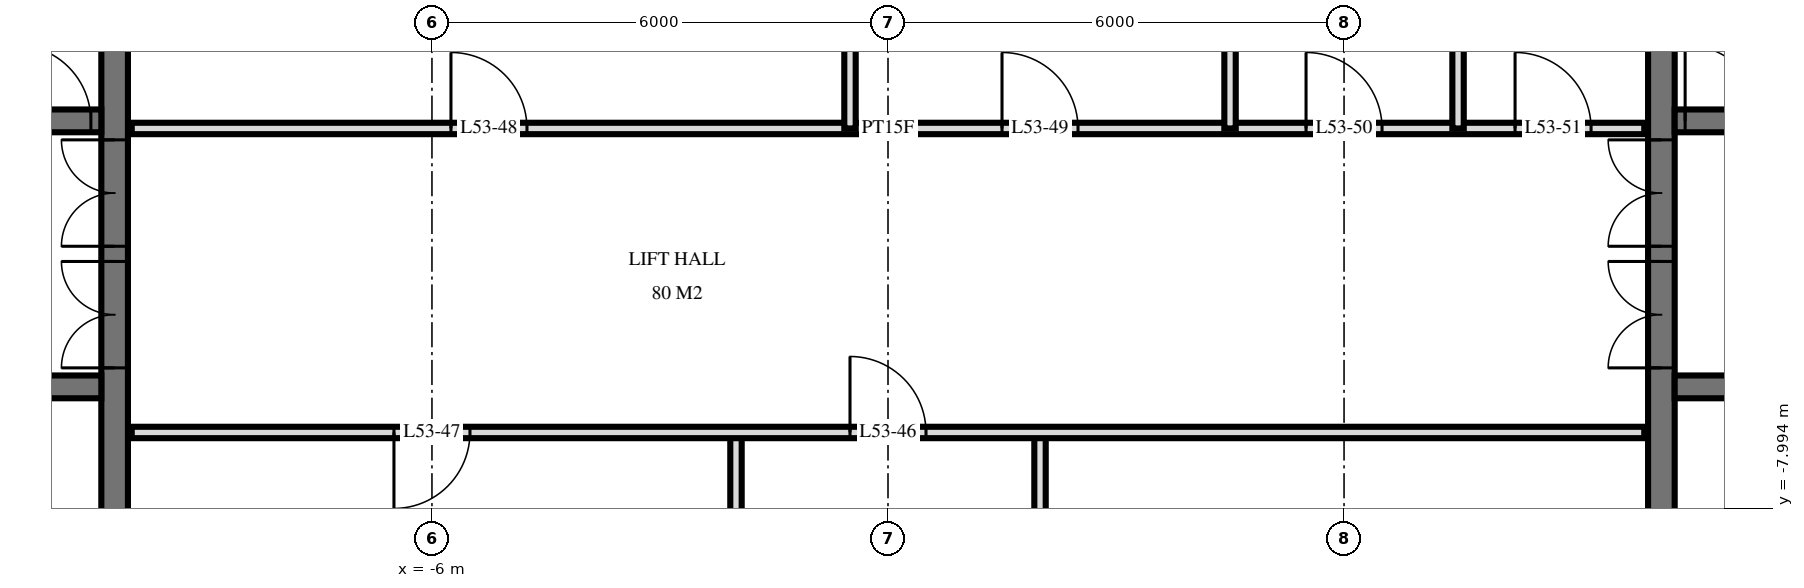
"""IFC4 building model, lengths in metres.
Left out: names, types, materials, properties, quantities, classifications, styles, units other than length and angle.
Written with IfcOpenShell. Run it as: python <this file> out.ifc"""

import sys

from ifc_helpers import new_model, si_unit, direction, frame, frame_2d, origin, place, context, subcontext, project, spatial, rectangle, extrude, element, fill, save


model = new_model("IFC4")
c1 = context("Model", 3, precision=1e-05, world=origin(), true_north=direction((0.0, 1.0)))
c2 = subcontext(c1, "Body", "Model", "MODEL_VIEW")
j1 = project(units=[si_unit("LENGTHUNIT", "METRE"), si_unit("PLANEANGLEUNIT", "RADIAN")], contexts=[c1])
p1 = place(None, origin())
s1 = spatial("IfcSite", under=j1, at=p1, CompositionType="ELEMENT")
p2 = place(p1, origin())
s2 = spatial("IfcBuilding", under=s1, at=p2, CompositionType="ELEMENT")
p3 = place(p2, frame((0.0, 0.0, 204.6)))
s3 = spatial("IfcBuildingStorey", under=s2, at=p3, CompositionType="ELEMENT", Elevation=204.6)
p4 = place(p3, frame((-10.175, -14.55, 0.0), z_axis=(0.0, 0.0, 1.0), x_axis=(0.0, 1.0, 0.0)))
e1 = element("IfcWall", 1, at=p4, inside=s3, PredefinedType="SHEAR", context=c2, shape_type="SweptSolid", body=[
    extrude(rectangle(XDim=14.1, YDim=0.35, at=frame_2d((7.05, 0.0))), origin(), (0.0, 0.0, 1.0), 3.5),
])
p5 = place(p4, frame((8.4, 0.0, 0.0)))
e2 = element("IfcOpeningElement", 2, at=p5, cuts=e1, PredefinedType="OPENING", context=c2, shape_type="SweptSolid", body=[
    extrude(rectangle(XDim=1.4, YDim=2.4, at=frame_2d((0.7, 1.2))), frame((0.0, 0.185, 0.0), z_axis=(0.0, -1.0, 0.0), x_axis=(1.0, 0.0, 0.0)), (0.0, 0.0, 1.0), 0.37),
])
p6 = place(p4, frame((10.0, 0.0, 0.0)))
e3 = element("IfcOpeningElement", 3, at=p6, cuts=e1, PredefinedType="OPENING", context=c2, shape_type="SweptSolid", body=[
    extrude(rectangle(XDim=1.4, YDim=2.4, at=frame_2d((0.7, 1.2))), frame((0.0, 0.185, 0.0), z_axis=(0.0, -1.0, 0.0), x_axis=(1.0, 0.0, 0.0)), (0.0, 0.0, 1.0), 0.37),
])
p7 = place(p4, frame((4.0, 0.0, 0.0)))
e4 = element("IfcOpeningElement", 4, at=p7, cuts=e1, PredefinedType="OPENING", context=c2, shape_type="SweptSolid", body=[
    extrude(rectangle(XDim=1.2, YDim=2.1, at=frame_2d((0.6, 1.05))), frame((0.0, 0.185, 0.0), z_axis=(0.0, -1.0, 0.0), x_axis=(1.0, 0.0, 0.0)), (0.0, 0.0, 1.0), 0.37),
])
p8 = place(p3, frame((-24.05, -2.9, 0.0), z_axis=(0.0, 0.0, 1.0), x_axis=(1.0, 0.0, 0.0)))
e5 = element("IfcWall", 5, at=p8, inside=s3, PredefinedType="SHEAR", context=c2, shape_type="SweptSolid", body=[
    extrude(rectangle(XDim=13.7, YDim=0.3, at=frame_2d((6.85, 0.0))), origin(), (0.0, 0.0, 1.0), 3.5),
])
p9 = place(p8, frame((0.55, 0.0, 0.0)))
e6 = element("IfcOpeningElement", 6, at=p9, cuts=e5, PredefinedType="OPENING", context=c2, shape_type="SweptSolid", body=[
    extrude(rectangle(XDim=1.1, YDim=2.1, at=frame_2d((0.55, 1.05))), frame((0.0, 0.16, 0.0), z_axis=(0.0, -1.0, 0.0), x_axis=(1.0, 0.0, 0.0)), (0.0, 0.0, 1.0), 0.32),
])
p10 = place(p8, frame((6.613, 0.0, 0.0)))
e7 = element("IfcOpeningElement", 7, at=p10, cuts=e5, PredefinedType="OPENING", context=c2, shape_type="SweptSolid", body=[
    extrude(rectangle(XDim=0.9, YDim=2.1, at=frame_2d((0.45, 1.05))), frame((0.0, 0.16, 0.0), z_axis=(0.0, -1.0, 0.0), x_axis=(1.0, 0.0, 0.0)), (0.0, 0.0, 1.0), 0.32),
])
p11 = place(p8, frame((5.188, 0.0, 0.0)))
e8 = element("IfcOpeningElement", 8, at=p11, cuts=e5, PredefinedType="OPENING", context=c2, shape_type="SweptSolid", body=[
    extrude(rectangle(XDim=0.9, YDim=2.1, at=frame_2d((0.45, 1.05))), frame((0.0, 0.16, 0.0), z_axis=(0.0, -1.0, 0.0), x_axis=(1.0, 0.0, 0.0)), (0.0, 0.0, 1.0), 0.32),
])
p12 = place(p8, frame((12.562, 0.0, 0.0)))
e9 = element("IfcOpeningElement", 9, at=p12, cuts=e5, PredefinedType="OPENING", context=c2, shape_type="SweptSolid", body=[
    extrude(rectangle(XDim=1.0, YDim=2.1, at=frame_2d((0.5, 1.05))), frame((0.0, 0.16, 0.0), z_axis=(0.0, -1.0, 0.0), x_axis=(1.0, 0.0, 0.0)), (0.0, 0.0, 1.0), 0.32),
])
p13 = place(p8, frame((11.137, 0.0, 0.0)))
e10 = element("IfcOpeningElement", 10, at=p13, cuts=e5, PredefinedType="OPENING", context=c2, shape_type="SweptSolid", body=[
    extrude(rectangle(XDim=1.0, YDim=2.1, at=frame_2d((0.5, 1.05))), frame((0.0, 0.16, 0.0), z_axis=(0.0, -1.0, 0.0), x_axis=(1.0, 0.0, 0.0)), (0.0, 0.0, 1.0), 0.32),
])
p14 = place(p8, frame((8.85, 0.0, 0.0)))
e11 = element("IfcOpeningElement", 11, at=p14, cuts=e5, PredefinedType="OPENING", context=c2, shape_type="SweptSolid", body=[
    extrude(rectangle(XDim=1.0, YDim=2.1, at=frame_2d((0.5, 1.05))), frame((0.0, 0.16, 0.0), z_axis=(0.0, -1.0, 0.0), x_axis=(1.0, 0.0, 0.0)), (0.0, 0.0, 1.0), 0.32),
])
p15 = place(p8, frame((3.0, 0.0, 0.0)))
e12 = element("IfcOpeningElement", 12, at=p15, cuts=e5, PredefinedType="OPENING", context=c2, shape_type="SweptSolid", body=[
    extrude(rectangle(XDim=1.0, YDim=2.1, at=frame_2d((0.5, 1.05))), frame((0.0, 0.16, 0.0), z_axis=(0.0, -1.0, 0.0), x_axis=(1.0, 0.0, 0.0)), (0.0, 0.0, 1.0), 0.32),
])
p16 = place(p3, frame((-24.05, -6.4, 0.0), z_axis=(0.0, 0.0, 1.0), x_axis=(1.0, 0.0, 0.0)))
e13 = element("IfcWall", 13, at=p16, inside=s3, PredefinedType="SHEAR", context=c2, shape_type="SweptSolid", body=[
    extrude(rectangle(XDim=13.7, YDim=0.3, at=frame_2d((6.85, 0.0))), origin(), (0.0, 0.0, 1.0), 3.5),
])
p17 = place(p16, frame((0.55, 0.0, 0.0)))
e14 = element("IfcOpeningElement", 14, at=p17, cuts=e13, PredefinedType="OPENING", context=c2, shape_type="SweptSolid", body=[
    extrude(rectangle(XDim=1.1, YDim=2.1, at=frame_2d((0.55, 1.05))), frame((0.0, 0.16, 0.0), z_axis=(0.0, -1.0, 0.0), x_axis=(1.0, 0.0, 0.0)), (0.0, 0.0, 1.0), 0.32),
])
p18 = place(p16, frame((5.8, 0.0, 0.0)))
e15 = element("IfcOpeningElement", 15, at=p18, cuts=e13, PredefinedType="OPENING", context=c2, shape_type="SweptSolid", body=[
    extrude(rectangle(XDim=1.1, YDim=2.1, at=frame_2d((0.55, 1.05))), frame((0.0, 0.16, 0.0), z_axis=(0.0, -1.0, 0.0), x_axis=(1.0, 0.0, 0.0)), (0.0, 0.0, 1.0), 0.32),
])
p19 = place(p3, frame((10.175, -14.55, 0.0), z_axis=(0.0, 0.0, 1.0), x_axis=(0.0, 1.0, 0.0)))
e16 = element("IfcWall", 16, at=p19, inside=s3, PredefinedType="SHEAR", context=c2, shape_type="SweptSolid", body=[
    extrude(rectangle(XDim=14.1, YDim=0.35, at=frame_2d((7.05, 0.0))), origin(), (0.0, 0.0, 1.0), 3.5),
])
p20 = place(p19, frame((8.4, 0.0, 0.0)))
e17 = element("IfcOpeningElement", 17, at=p20, cuts=e16, PredefinedType="OPENING", context=c2, shape_type="SweptSolid", body=[
    extrude(rectangle(XDim=1.4, YDim=2.4, at=frame_2d((0.7, 1.2))), frame((0.0, 0.185, 0.0), z_axis=(0.0, -1.0, 0.0), x_axis=(1.0, 0.0, 0.0)), (0.0, 0.0, 1.0), 0.37),
])
p21 = place(p19, frame((10.0, 0.0, 0.0)))
e18 = element("IfcOpeningElement", 18, at=p21, cuts=e16, PredefinedType="OPENING", context=c2, shape_type="SweptSolid", body=[
    extrude(rectangle(XDim=1.4, YDim=2.4, at=frame_2d((0.7, 1.2))), frame((0.0, 0.185, 0.0), z_axis=(0.0, -1.0, 0.0), x_axis=(1.0, 0.0, 0.0)), (0.0, 0.0, 1.0), 0.37),
])
p22 = place(p19, frame((4.0, 0.0, 0.0)))
e19 = element("IfcOpeningElement", 19, at=p22, cuts=e16, PredefinedType="OPENING", context=c2, shape_type="SweptSolid", body=[
    extrude(rectangle(XDim=1.2, YDim=2.1, at=frame_2d((0.6, 1.05))), frame((0.0, 0.185, 0.0), z_axis=(0.0, -1.0, 0.0), x_axis=(1.0, 0.0, 0.0)), (0.0, 0.0, 1.0), 0.37),
])
p23 = place(p3, frame((10.35, -2.9, 0.0), z_axis=(0.0, 0.0, 1.0), x_axis=(1.0, 0.0, 0.0)))
e20 = element("IfcWall", 20, at=p23, inside=s3, PredefinedType="SHEAR", context=c2, shape_type="SweptSolid", body=[
    extrude(rectangle(XDim=13.7, YDim=0.3, at=frame_2d((6.85, 0.0))), origin(), (0.0, 0.0, 1.0), 3.5),
])
p24 = place(p23, frame((12.05, 0.0, 0.0)))
e21 = element("IfcOpeningElement", 21, at=p24, cuts=e20, PredefinedType="OPENING", context=c2, shape_type="SweptSolid", body=[
    extrude(rectangle(XDim=1.1, YDim=2.1, at=frame_2d((0.55, 1.05))), frame((0.0, 0.16, 0.0), z_axis=(0.0, -1.0, 0.0), x_axis=(1.0, 0.0, 0.0)), (0.0, 0.0, 1.0), 0.32),
])
p25 = place(p23, frame((6.188, 0.0, 0.0)))
e22 = element("IfcOpeningElement", 22, at=p25, cuts=e20, PredefinedType="OPENING", context=c2, shape_type="SweptSolid", body=[
    extrude(rectangle(XDim=0.9, YDim=2.1, at=frame_2d((0.45, 1.05))), frame((0.0, 0.16, 0.0), z_axis=(0.0, -1.0, 0.0), x_axis=(1.0, 0.0, 0.0)), (0.0, 0.0, 1.0), 0.32),
])
p26 = place(p23, frame((7.613, 0.0, 0.0)))
e23 = element("IfcOpeningElement", 23, at=p26, cuts=e20, PredefinedType="OPENING", context=c2, shape_type="SweptSolid", body=[
    extrude(rectangle(XDim=0.9, YDim=2.1, at=frame_2d((0.45, 1.05))), frame((0.0, 0.16, 0.0), z_axis=(0.0, -1.0, 0.0), x_axis=(1.0, 0.0, 0.0)), (0.0, 0.0, 1.0), 0.32),
])
p27 = place(p23, frame((0.137, 0.0, 0.0)))
e24 = element("IfcOpeningElement", 24, at=p27, cuts=e20, PredefinedType="OPENING", context=c2, shape_type="SweptSolid", body=[
    extrude(rectangle(XDim=1.0, YDim=2.1, at=frame_2d((0.5, 1.05))), frame((0.0, 0.16, 0.0), z_axis=(0.0, -1.0, 0.0), x_axis=(1.0, 0.0, 0.0)), (0.0, 0.0, 1.0), 0.32),
])
p28 = place(p23, frame((1.562, 0.0, 0.0)))
e25 = element("IfcOpeningElement", 25, at=p28, cuts=e20, PredefinedType="OPENING", context=c2, shape_type="SweptSolid", body=[
    extrude(rectangle(XDim=1.0, YDim=2.1, at=frame_2d((0.5, 1.05))), frame((0.0, 0.16, 0.0), z_axis=(0.0, -1.0, 0.0), x_axis=(1.0, 0.0, 0.0)), (0.0, 0.0, 1.0), 0.32),
])
p29 = place(p23, frame((3.85, 0.0, 0.0)))
e26 = element("IfcOpeningElement", 26, at=p29, cuts=e20, PredefinedType="OPENING", context=c2, shape_type="SweptSolid", body=[
    extrude(rectangle(XDim=1.0, YDim=2.1, at=frame_2d((0.5, 1.05))), frame((0.0, 0.16, 0.0), z_axis=(0.0, -1.0, 0.0), x_axis=(1.0, 0.0, 0.0)), (0.0, 0.0, 1.0), 0.32),
])
p30 = place(p23, frame((9.7, 0.0, 0.0)))
e27 = element("IfcOpeningElement", 27, at=p30, cuts=e20, PredefinedType="OPENING", context=c2, shape_type="SweptSolid", body=[
    extrude(rectangle(XDim=1.0, YDim=2.1, at=frame_2d((0.5, 1.05))), frame((0.0, 0.16, 0.0), z_axis=(0.0, -1.0, 0.0), x_axis=(1.0, 0.0, 0.0)), (0.0, 0.0, 1.0), 0.32),
])
p31 = place(p3, frame((10.35, -6.4, 0.0), z_axis=(0.0, 0.0, 1.0), x_axis=(1.0, 0.0, 0.0)))
e28 = element("IfcWall", 28, at=p31, inside=s3, PredefinedType="SHEAR", context=c2, shape_type="SweptSolid", body=[
    extrude(rectangle(XDim=13.7, YDim=0.3, at=frame_2d((6.85, 0.0))), origin(), (0.0, 0.0, 1.0), 3.5),
])
p32 = place(p31, frame((12.05, 0.0, 0.0)))
e29 = element("IfcOpeningElement", 29, at=p32, cuts=e28, PredefinedType="OPENING", context=c2, shape_type="SweptSolid", body=[
    extrude(rectangle(XDim=1.1, YDim=2.1, at=frame_2d((0.55, 1.05))), frame((0.0, 0.16, 0.0), z_axis=(0.0, -1.0, 0.0), x_axis=(1.0, 0.0, 0.0)), (0.0, 0.0, 1.0), 0.32),
])
p33 = place(p31, frame((6.8, 0.0, 0.0)))
e30 = element("IfcOpeningElement", 30, at=p33, cuts=e28, PredefinedType="OPENING", context=c2, shape_type="SweptSolid", body=[
    extrude(rectangle(XDim=1.1, YDim=2.1, at=frame_2d((0.55, 1.05))), frame((0.0, 0.16, 0.0), z_axis=(0.0, -1.0, 0.0), x_axis=(1.0, 0.0, 0.0)), (0.0, 0.0, 1.0), 0.32),
])
for number, where, z_axis, x_axis in (
    (31, (7.5, -3.0, 0.0), (0.0, 0.0, 1.0), (0.0, 1.0, 0.0)),
    (32, (4.5, -3.0, 0.0), (0.0, 0.0, 1.0), (0.0, 1.0, 0.0)),
):
    element("IfcWall", number, at=place(p3, frame(where, z_axis=z_axis, x_axis=x_axis)), inside=s3, PredefinedType="PLUMBINGWALL", context=c2, shape_type="SweptSolid", body=[
        extrude(rectangle(XDim=4.02, YDim=0.15, at=frame_2d((2.01, 0.0))), origin(), (0.0, 0.0, 1.0), 3.22),
    ])
p34 = place(p3, frame((2.0, -11.0, 0.0), z_axis=(0.0, 0.0, 1.0), x_axis=(0.0, 1.0, 0.0)))
e33 = element("IfcWall", 33, at=p34, inside=s3, PredefinedType="PARTITIONING", context=c2, shape_type="SweptSolid", body=[
    extrude(rectangle(XDim=4.0, YDim=0.15, at=frame_2d((2.0, 0.0))), origin(), (0.0, 0.0, 1.0), 3.22),
])
p35 = place(p3, frame((-0.5, -3.0, 0.0), z_axis=(0.0, 0.0, 1.0), x_axis=(0.0, 1.0, 0.0)))
e34 = element("IfcWall", 34, at=p35, inside=s3, PredefinedType="PARTITIONING", context=c2, shape_type="SweptSolid", body=[
    extrude(rectangle(XDim=4.02, YDim=0.15, at=frame_2d((2.01, 0.0))), origin(), (0.0, 0.0, 1.0), 3.22),
])
p36 = place(p3, frame((-2.0, -11.0, 0.0), z_axis=(0.0, 0.0, 1.0), x_axis=(0.0, 1.0, 0.0)))
e35 = element("IfcWall", 35, at=p36, inside=s3, PredefinedType="PARTITIONING", context=c2, shape_type="SweptSolid", body=[
    extrude(rectangle(XDim=4.0, YDim=0.15, at=frame_2d((2.0, 0.0))), origin(), (0.0, 0.0, 1.0), 3.22),
])
p37 = place(p3, frame((-9.95, -7.0, 0.0), z_axis=(0.0, 0.0, 1.0), x_axis=(1.0, 0.0, 0.0)))
e36 = element("IfcWall", 36, at=p37, inside=s3, PredefinedType="PARTITIONING", context=c2, shape_type="SweptSolid", body=[
    extrude(rectangle(XDim=19.9, YDim=0.15, at=frame_2d((9.95, 0.0))), origin(), (0.0, 0.0, 1.0), 3.22),
])
p38 = place(p37, frame((9.45, 0.0, 0.0)))
e37 = element("IfcOpeningElement", 37, at=p38, cuts=e36, PredefinedType="OPENING", context=c2, shape_type="SweptSolid", body=[
    extrude(rectangle(XDim=1.0, YDim=2.1, at=frame_2d((0.5, 1.05))), frame((0.0, 0.085, 0.0), z_axis=(0.0, -1.0, 0.0), x_axis=(1.0, 0.0, 0.0)), (0.0, 0.0, 1.0), 0.17),
])
p39 = place(p37, frame((3.45, 0.0, 0.0)))
e38 = element("IfcOpeningElement", 38, at=p39, cuts=e36, PredefinedType="OPENING", context=c2, shape_type="SweptSolid", body=[
    extrude(rectangle(XDim=1.0, YDim=2.1, at=frame_2d((0.5, 1.05))), frame((0.0, 0.085, 0.0), z_axis=(0.0, -1.0, 0.0), x_axis=(1.0, 0.0, 0.0)), (0.0, 0.0, 1.0), 0.17),
])
p40 = place(p3, frame((-9.95, -3.0, 0.0), z_axis=(0.0, 0.0, 1.0), x_axis=(1.0, 0.0, 0.0)))
e39 = element("IfcWall", 39, at=p40, inside=s3, PredefinedType="PARTITIONING", context=c2, shape_type="SweptSolid", body=[
    extrude(rectangle(XDim=19.9, YDim=0.15, at=frame_2d((9.95, 0.0))), origin(), (0.0, 0.0, 1.0), 3.22),
])
p41 = place(p40, frame((4.2, 0.0, 0.0)))
e40 = element("IfcOpeningElement", 40, at=p41, cuts=e39, PredefinedType="OPENING", context=c2, shape_type="SweptSolid", body=[
    extrude(rectangle(XDim=1.0, YDim=2.1, at=frame_2d((0.5, 1.05))), frame((0.0, 0.085, 0.0), z_axis=(0.0, -1.0, 0.0), x_axis=(1.0, 0.0, 0.0)), (0.0, 0.0, 1.0), 0.17),
])
p42 = place(p40, frame((11.45, 0.0, 0.0)))
e41 = element("IfcOpeningElement", 41, at=p42, cuts=e39, PredefinedType="OPENING", context=c2, shape_type="SweptSolid", body=[
    extrude(rectangle(XDim=1.0, YDim=2.1, at=frame_2d((0.5, 1.05))), frame((0.0, 0.085, 0.0), z_axis=(0.0, -1.0, 0.0), x_axis=(1.0, 0.0, 0.0)), (0.0, 0.0, 1.0), 0.17),
])
p43 = place(p40, frame((15.45, 0.0, 0.0)))
e42 = element("IfcOpeningElement", 42, at=p43, cuts=e39, PredefinedType="OPENING", context=c2, shape_type="SweptSolid", body=[
    extrude(rectangle(XDim=1.0, YDim=2.1, at=frame_2d((0.5, 1.05))), frame((0.0, 0.085, 0.0), z_axis=(0.0, -1.0, 0.0), x_axis=(1.0, 0.0, 0.0)), (0.0, 0.0, 1.0), 0.17),
])
p44 = place(p40, frame((18.2, 0.0, 0.0)))
e43 = element("IfcOpeningElement", 43, at=p44, cuts=e39, PredefinedType="OPENING", context=c2, shape_type="SweptSolid", body=[
    extrude(rectangle(XDim=1.0, YDim=2.1, at=frame_2d((0.5, 1.05))), frame((0.0, 0.085, 0.0), z_axis=(0.0, -1.0, 0.0), x_axis=(1.0, 0.0, 0.0)), (0.0, 0.0, 1.0), 0.17),
])
p45 = place(p5, origin())
e44 = element("IfcDoor", 44, at=p45, inside=s3, OperationType="DOUBLE_DOOR_SINGLE_SWING", PredefinedType="DOOR", context=c2, shape_type="SweptSolid", body=[
    extrude(rectangle(XDim=1.4, YDim=2.4, at=frame_2d((0.7, 1.2))), frame((0.0, 0.025, 0.0), z_axis=(0.0, -1.0, 0.0), x_axis=(1.0, 0.0, 0.0)), (0.0, 0.0, 1.0), 0.05),
])
fill(e2, e44)
p46 = place(p6, origin())
e45 = element("IfcDoor", 45, at=p46, inside=s3, OperationType="DOUBLE_DOOR_SINGLE_SWING", PredefinedType="DOOR", context=c2, shape_type="SweptSolid", body=[
    extrude(rectangle(XDim=1.4, YDim=2.4, at=frame_2d((0.7, 1.2))), frame((0.0, 0.025, 0.0), z_axis=(0.0, -1.0, 0.0), x_axis=(1.0, 0.0, 0.0)), (0.0, 0.0, 1.0), 0.05),
])
fill(e3, e45)
p47 = place(p12, origin())
e46 = element("IfcDoor", 46, at=p47, inside=s3, OperationType="SINGLE_SWING_RIGHT", PredefinedType="DOOR", context=c2, shape_type="SweptSolid", body=[
    extrude(rectangle(XDim=1.0, YDim=2.1, at=frame_2d((0.5, 1.05))), frame((0.0, 0.025, 0.0), z_axis=(0.0, -1.0, 0.0), x_axis=(1.0, 0.0, 0.0)), (0.0, 0.0, 1.0), 0.05),
])
fill(e9, e46)
p48 = place(p20, origin())
e47 = element("IfcDoor", 47, at=p48, inside=s3, OperationType="DOUBLE_DOOR_SINGLE_SWING", PredefinedType="DOOR", context=c2, shape_type="SweptSolid", body=[
    extrude(rectangle(XDim=1.4, YDim=2.4, at=frame_2d((0.7, 1.2))), frame((0.0, 0.025, 0.0), z_axis=(0.0, -1.0, 0.0), x_axis=(1.0, 0.0, 0.0)), (0.0, 0.0, 1.0), 0.05),
])
fill(e17, e47)
p49 = place(p21, origin())
e48 = element("IfcDoor", 48, at=p49, inside=s3, OperationType="DOUBLE_DOOR_SINGLE_SWING", PredefinedType="DOOR", context=c2, shape_type="SweptSolid", body=[
    extrude(rectangle(XDim=1.4, YDim=2.4, at=frame_2d((0.7, 1.2))), frame((0.0, 0.025, 0.0), z_axis=(0.0, -1.0, 0.0), x_axis=(1.0, 0.0, 0.0)), (0.0, 0.0, 1.0), 0.05),
])
fill(e18, e48)
p50 = place(p27, origin())
e49 = element("IfcDoor", 49, at=p50, inside=s3, OperationType="SINGLE_SWING_RIGHT", PredefinedType="DOOR", context=c2, shape_type="SweptSolid", body=[
    extrude(rectangle(XDim=1.0, YDim=2.1, at=frame_2d((0.5, 1.05))), frame((0.0, 0.025, 0.0), z_axis=(0.0, -1.0, 0.0), x_axis=(1.0, 0.0, 0.0)), (0.0, 0.0, 1.0), 0.05),
])
fill(e24, e49)
p51 = place(p38, origin())
e50 = element("IfcDoor", 50, at=p51, inside=s3, OperationType="SINGLE_SWING_RIGHT", PredefinedType="DOOR", context=c2, shape_type="SweptSolid", body=[
    extrude(rectangle(XDim=1.0, YDim=2.1, at=frame_2d((0.5, 1.05))), frame((0.0, 0.025, 0.0), z_axis=(0.0, -1.0, 0.0), x_axis=(1.0, 0.0, 0.0)), (0.0, 0.0, 1.0), 0.05),
])
fill(e37, e50)
p52 = place(p39, frame((0.5, 0.0, 0.0), z_axis=(0.0, 0.0, 1.0), x_axis=(-1.0, 0.0, 0.0)))
e51 = element("IfcDoor", 51, at=p52, inside=s3, OperationType="SINGLE_SWING_LEFT", PredefinedType="DOOR", context=c2, shape_type="SweptSolid", body=[
    extrude(rectangle(XDim=1.0, YDim=2.1, at=frame_2d((0.0, 1.05))), frame((0.0, -0.025, 0.0), z_axis=(0.0, 1.0, 0.0), x_axis=(-1.0, 0.0, 0.0)), (0.0, 0.0, 1.0), 0.05),
])
fill(e38, e51)
p53 = place(p41, origin())
e52 = element("IfcDoor", 52, at=p53, inside=s3, OperationType="SINGLE_SWING_RIGHT", PredefinedType="DOOR", context=c2, shape_type="SweptSolid", body=[
    extrude(rectangle(XDim=1.0, YDim=2.1, at=frame_2d((0.5, 1.05))), frame((0.0, 0.025, 0.0), z_axis=(0.0, -1.0, 0.0), x_axis=(1.0, 0.0, 0.0)), (0.0, 0.0, 1.0), 0.05),
])
fill(e40, e52)
p54 = place(p42, origin())
e53 = element("IfcDoor", 53, at=p54, inside=s3, OperationType="SINGLE_SWING_RIGHT", PredefinedType="DOOR", context=c2, shape_type="SweptSolid", body=[
    extrude(rectangle(XDim=1.0, YDim=2.1, at=frame_2d((0.5, 1.05))), frame((0.0, 0.025, 0.0), z_axis=(0.0, -1.0, 0.0), x_axis=(1.0, 0.0, 0.0)), (0.0, 0.0, 1.0), 0.05),
])
fill(e41, e53)
p55 = place(p43, origin())
e54 = element("IfcDoor", 54, at=p55, inside=s3, OperationType="SINGLE_SWING_RIGHT", PredefinedType="DOOR", context=c2, shape_type="SweptSolid", body=[
    extrude(rectangle(XDim=1.0, YDim=2.1, at=frame_2d((0.5, 1.05))), frame((0.0, 0.025, 0.0), z_axis=(0.0, -1.0, 0.0), x_axis=(1.0, 0.0, 0.0)), (0.0, 0.0, 1.0), 0.05),
])
fill(e42, e54)
p56 = place(p44, origin())
e55 = element("IfcDoor", 55, at=p56, inside=s3, OperationType="SINGLE_SWING_RIGHT", PredefinedType="DOOR", context=c2, shape_type="SweptSolid", body=[
    extrude(rectangle(XDim=1.0, YDim=2.1, at=frame_2d((0.5, 1.05))), frame((0.0, 0.025, 0.0), z_axis=(0.0, -1.0, 0.0), x_axis=(1.0, 0.0, 0.0)), (0.0, 0.0, 1.0), 0.05),
])
fill(e43, e55)
save(model, sys.argv[1])
